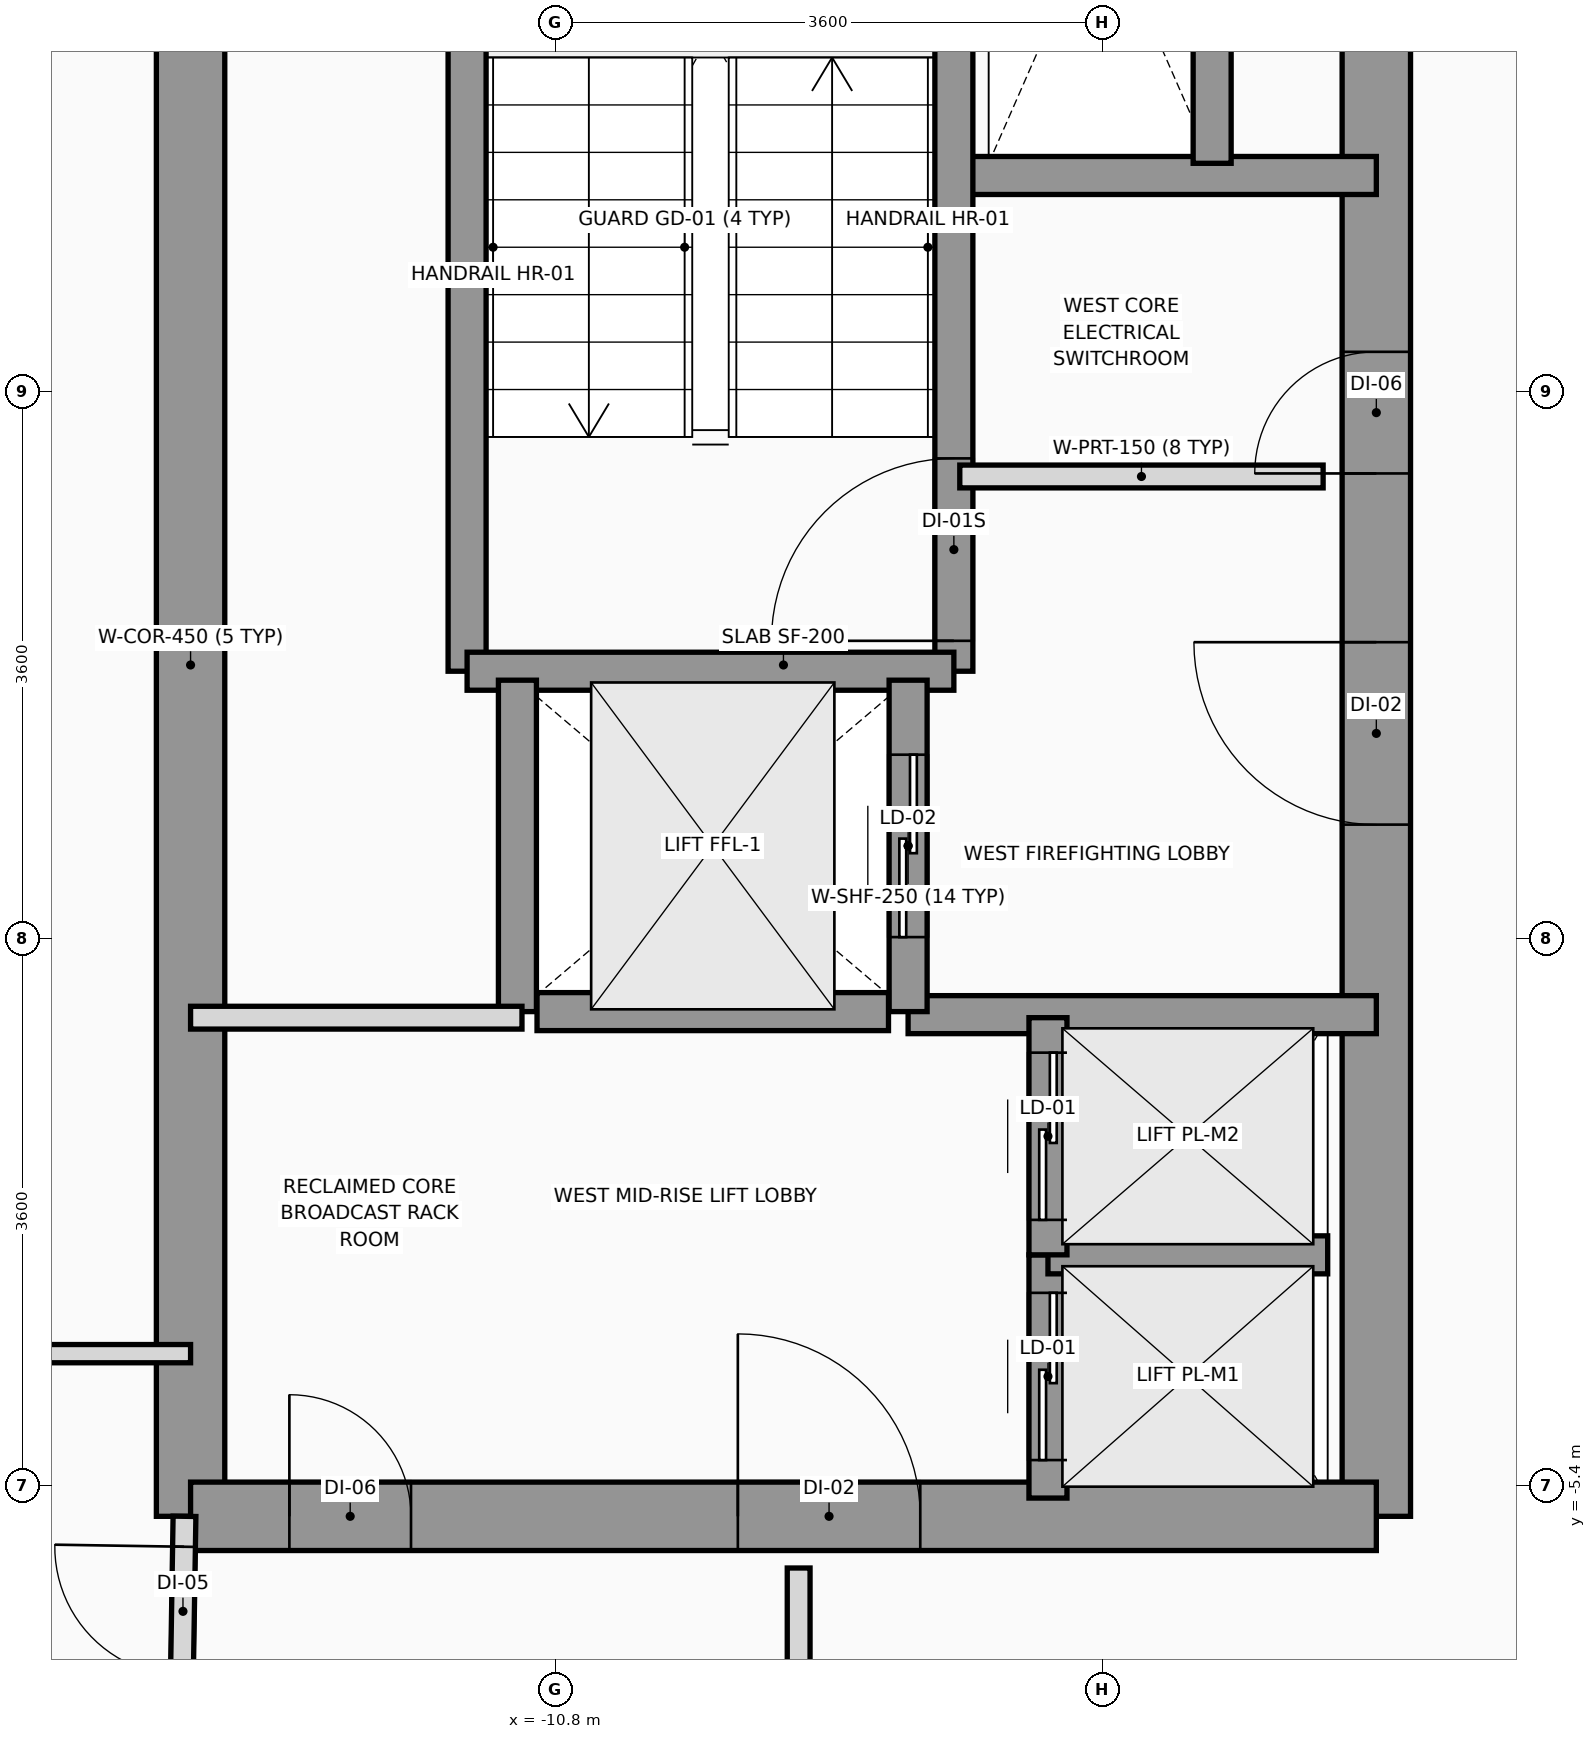
"""IFC4 building model, lengths in metres.
Left out: names, types, materials, properties, quantities, classifications, styles, units other than length and angle.
Written with IfcOpenShell. Run it as: python <this file> out.ifc"""

import sys

from ifc_helpers import new_model, si_unit, direction, frame, frame_2d, origin, place, context, subcontext, project, spatial, rectangle, extrude, source, transform, mapped, element, fill, save


model = new_model("IFC4")
c1 = context("Model", 3, precision=1e-05, world=origin(), true_north=direction((0.0, 1.0)))
c2 = subcontext(c1, "Body", "Model", "MODEL_VIEW")
j1 = project(units=[si_unit("LENGTHUNIT", "METRE"), si_unit("PLANEANGLEUNIT", "RADIAN")], contexts=[c1])
p1 = place(None, origin())
s1 = spatial("IfcSite", under=j1, at=p1, CompositionType="ELEMENT")
p2 = place(p1, origin())
s2 = spatial("IfcBuilding", under=s1, at=p2, CompositionType="ELEMENT")
p3 = place(p2, frame((0.0, 0.0, 100.6)))
s3 = spatial("IfcBuildingStorey", under=s2, at=p3, CompositionType="ELEMENT", Elevation=100.6)
p4 = place(p3, frame((-13.2, -5.6, 0.0), z_axis=(0.0, 0.0, 1.0), x_axis=(0.0, 1.0, 0.0)))
e1 = element("IfcWall", 1, at=p4, inside=s3, PredefinedType="SHEAR", context=c2, shape_type="SweptSolid", body=[
    extrude(rectangle(XDim=11.2, YDim=0.45, at=frame_2d((5.6, 0.0))), origin(), (0.0, 0.0, 1.0), 3.2),
])
p5 = place(p3, frame((-5.4, -5.6, 0.0), z_axis=(0.0, 0.0, 1.0), x_axis=(0.0, 1.0, 0.0)))
e2 = element("IfcWall", 2, at=p5, inside=s3, PredefinedType="SHEAR", context=c2, shape_type="SweptSolid", body=[
    extrude(rectangle(XDim=12.5, YDim=0.45, at=frame_2d((6.25, 0.0))), origin(), (0.0, 0.0, 1.0), 3.2),
])
p6 = place(p5, frame((4.55, 0.0, 0.0)))
e3 = element("IfcOpeningElement", 3, at=p6, cuts=e2, PredefinedType="OPENING", context=c2, shape_type="SweptSolid", body=[
    extrude(rectangle(XDim=1.2, YDim=2.2, at=frame_2d((0.6, 1.1))), frame((0.0, 0.235, 0.0), z_axis=(0.0, -1.0, 0.0), x_axis=(1.0, 0.0, 0.0)), (0.0, 0.0, 1.0), 0.47),
])
p7 = place(p5, frame((6.86, 0.0, 0.0)))
e4 = element("IfcOpeningElement", 4, at=p7, cuts=e2, PredefinedType="OPENING", context=c2, shape_type="SweptSolid", body=[
    extrude(rectangle(XDim=0.8, YDim=2.1, at=frame_2d((0.4, 1.05))), frame((0.0, 0.235, 0.0), z_axis=(0.0, -1.0, 0.0), x_axis=(1.0, 0.0, 0.0)), (0.0, 0.0, 1.0), 0.47),
])
p8 = place(p3, frame((-13.2, -5.6, 0.0), z_axis=(0.0, 0.0, 1.0), x_axis=(1.0, 0.0, 0.0)))
e5 = element("IfcWall", 5, at=p8, inside=s3, PredefinedType="SHEAR", context=c2, shape_type="SweptSolid", body=[
    extrude(rectangle(XDim=7.8, YDim=0.45, at=frame_2d((3.9, 0.0))), origin(), (0.0, 0.0, 1.0), 3.2),
])
p9 = place(p8, frame((3.6, 0.0, 0.0)))
e6 = element("IfcOpeningElement", 6, at=p9, cuts=e5, PredefinedType="OPENING", context=c2, shape_type="SweptSolid", body=[
    extrude(rectangle(XDim=1.2, YDim=2.2, at=frame_2d((0.6, 1.1))), frame((0.0, 0.235, 0.0), z_axis=(0.0, -1.0, 0.0), x_axis=(1.0, 0.0, 0.0)), (0.0, 0.0, 1.0), 0.47),
])
p10 = place(p8, frame((0.65, 0.0, 0.0)))
e7 = element("IfcOpeningElement", 7, at=p10, cuts=e5, PredefinedType="OPENING", context=c2, shape_type="SweptSolid", body=[
    extrude(rectangle(XDim=0.8, YDim=2.1, at=frame_2d((0.4, 1.05))), frame((0.0, 0.235, 0.0), z_axis=(0.0, -1.0, 0.0), x_axis=(1.0, 0.0, 0.0)), (0.0, 0.0, 1.0), 0.47),
])
p11 = place(p3, frame((-8.18, 3.22, 0.0), z_axis=(0.0, 0.0, 1.0), x_axis=(1.0, 0.0, 0.0)))
e8 = element("IfcWall", 8, at=p11, inside=s3, PredefinedType="SOLIDWALL", context=c2, shape_type="SweptSolid", body=[
    extrude(rectangle(XDim=2.78, YDim=0.25, at=frame_2d((1.39, 0.0))), origin(), (0.0, 0.0, 1.0), 3.2),
])
p12 = place(p3, frame((-8.48, -2.3, 0.0), z_axis=(0.0, 0.0, 1.0), x_axis=(1.0, 0.0, 0.0)))
e9 = element("IfcWall", 9, at=p12, inside=s3, PredefinedType="SOLIDWALL", context=c2, shape_type="SweptSolid", body=[
    extrude(rectangle(XDim=3.08, YDim=0.25, at=frame_2d((1.54, 0.0))), origin(), (0.0, 0.0, 1.0), 3.2),
])
p13 = place(p3, frame((-8.179, -0.041, 0.0), z_axis=(0.0, 0.0, 1.0), x_axis=(0.0, 1.0, 0.0)))
e10 = element("IfcWall", 10, at=p13, inside=s3, PredefinedType="SOLIDWALL", context=c2, shape_type="SweptSolid", body=[
    extrude(rectangle(XDim=6.941, YDim=0.25, at=frame_2d((3.47, 0.0))), origin(), (0.0, 0.0, 1.0), 3.2),
])
p14 = place(p13, frame((0.2, 0.0, 0.0)))
e11 = element("IfcOpeningElement", 11, at=p14, cuts=e10, PredefinedType="OPENING", context=c2, shape_type="SweptSolid", body=[
    extrude(rectangle(XDim=1.2, YDim=2.2, at=frame_2d((0.6, 1.1))), frame((0.0, 0.135, 0.0), z_axis=(0.0, -1.0, 0.0), x_axis=(1.0, 0.0, 0.0)), (0.0, 0.0, 1.0), 0.27),
])
p15 = place(p3, frame((-11.381, -0.041, 0.0), z_axis=(0.0, 0.0, 1.0), x_axis=(0.0, 1.0, 0.0)))
e12 = element("IfcWall", 12, at=p15, inside=s3, PredefinedType="SOLIDWALL", context=c2, shape_type="SweptSolid", body=[
    extrude(rectangle(XDim=6.941, YDim=0.25, at=frame_2d((3.47, 0.0))), origin(), (0.0, 0.0, 1.0), 3.2),
])
p16 = place(p3, frame((-11.381, -0.041, 0.0), z_axis=(0.0, 0.0, 1.0), x_axis=(1.0, 0.0, 0.0)))
e13 = element("IfcWall", 13, at=p16, inside=s3, PredefinedType="SOLIDWALL", context=c2, shape_type="SweptSolid", body=[
    extrude(rectangle(XDim=3.202, YDim=0.25, at=frame_2d((1.601, 0.0))), origin(), (0.0, 0.0, 1.0), 3.2),
])
p17 = place(p3, frame((-11.05, -2.28, 0.0), z_axis=(0.0, 0.0, 1.0), x_axis=(0.0, 1.0, 0.0)))
e14 = element("IfcWall", 14, at=p17, inside=s3, PredefinedType="SOLIDWALL", context=c2, shape_type="SweptSolid", body=[
    extrude(rectangle(XDim=2.18, YDim=0.25, at=frame_2d((1.09, 0.0))), origin(), (0.0, 0.0, 1.0), 3.2),
])
p18 = place(p3, frame((-8.48, -2.28, 0.0), z_axis=(0.0, 0.0, 1.0), x_axis=(0.0, 1.0, 0.0)))
e15 = element("IfcWall", 15, at=p18, inside=s3, PredefinedType="SOLIDWALL", context=c2, shape_type="SweptSolid", body=[
    extrude(rectangle(XDim=2.18, YDim=0.25, at=frame_2d((1.09, 0.0))), origin(), (0.0, 0.0, 1.0), 3.2),
])
p19 = place(p18, frame((0.49, 0.0, 0.0)))
e16 = element("IfcOpeningElement", 16, at=p19, cuts=e15, PredefinedType="OPENING", context=c2, shape_type="SweptSolid", body=[
    extrude(rectangle(XDim=1.2, YDim=2.2, at=frame_2d((0.6, 1.1))), frame((0.0, 0.135, 0.0), z_axis=(0.0, -1.0, 0.0), x_axis=(1.0, 0.0, 0.0)), (0.0, 0.0, 1.0), 0.27),
])
p20 = place(p3, frame((-10.921, -2.28, 0.0), z_axis=(0.0, 0.0, 1.0), x_axis=(1.0, 0.0, 0.0)))
e17 = element("IfcWall", 17, at=p20, inside=s3, PredefinedType="SOLIDWALL", context=c2, shape_type="SweptSolid", body=[
    extrude(rectangle(XDim=2.312, YDim=0.25, at=frame_2d((1.156, 0.0))), origin(), (0.0, 0.0, 1.0), 3.2),
])
p21 = place(p3, frame((-7.56, -5.48, 0.0), z_axis=(0.0, 0.0, 1.0), x_axis=(0.0, 1.0, 0.0)))
e18 = element("IfcWall", 18, at=p21, inside=s3, PredefinedType="SOLIDWALL", context=c2, shape_type="SweptSolid", body=[
    extrude(rectangle(XDim=1.6, YDim=0.25, at=frame_2d((0.8, 0.0))), origin(), (0.0, 0.0, 1.0), 3.2),
])
p22 = place(p21, frame((0.25, 0.0, 0.0)))
e19 = element("IfcOpeningElement", 19, at=p22, cuts=e18, PredefinedType="OPENING", context=c2, shape_type="SweptSolid", body=[
    extrude(rectangle(XDim=1.1, YDim=2.2, at=frame_2d((0.55, 1.1))), frame((0.0, 0.135, 0.0), z_axis=(0.0, -1.0, 0.0), x_axis=(1.0, 0.0, 0.0)), (0.0, 0.0, 1.0), 0.27),
])
p23 = place(p3, frame((-7.56, -3.88, 0.0), z_axis=(0.0, 0.0, 1.0), x_axis=(1.0, 0.0, 0.0)))
e20 = element("IfcWall", 20, at=p23, inside=s3, PredefinedType="SOLIDWALL", context=c2, shape_type="SweptSolid", body=[
    extrude(rectangle(XDim=1.84, YDim=0.25, at=frame_2d((0.92, 0.0))), origin(), (0.0, 0.0, 1.0), 3.2),
])
p24 = place(p3, frame((-7.56, -3.88, 0.0), z_axis=(0.0, 0.0, 1.0), x_axis=(0.0, 1.0, 0.0)))
e21 = element("IfcWall", 21, at=p24, inside=s3, PredefinedType="SOLIDWALL", context=c2, shape_type="SweptSolid", body=[
    extrude(rectangle(XDim=1.56, YDim=0.25, at=frame_2d((0.78, 0.0))), origin(), (0.0, 0.0, 1.0), 3.2),
])
p25 = place(p24, frame((0.23, 0.0, 0.0)))
e22 = element("IfcOpeningElement", 22, at=p25, cuts=e21, PredefinedType="OPENING", context=c2, shape_type="SweptSolid", body=[
    extrude(rectangle(XDim=1.1, YDim=2.2, at=frame_2d((0.55, 1.1))), frame((0.0, 0.135, 0.0), z_axis=(0.0, -1.0, 0.0), x_axis=(1.0, 0.0, 0.0)), (0.0, 0.0, 1.0), 0.27),
])
p26 = place(p3, frame((-6.48, 3.3, 0.0), z_axis=(0.0, 0.0, 1.0), x_axis=(0.0, 1.0, 0.0)))
e23 = element("IfcWall", 23, at=p26, inside=s3, PredefinedType="SOLIDWALL", context=c2, shape_type="SweptSolid", body=[
    extrude(rectangle(XDim=1.68, YDim=0.25, at=frame_2d((0.84, 0.0))), origin(), (0.0, 0.0, 1.0), 3.2),
])
p27 = place(p3, frame((-8.14, 1.24, 0.0), z_axis=(0.0, 0.0, 1.0), x_axis=(1.0, 0.0, 0.0)))
e24 = element("IfcWall", 24, at=p27, inside=s3, PredefinedType="PARTITIONING", context=c2, shape_type="SweptSolid", body=[
    extrude(rectangle(XDim=2.39, YDim=0.15, at=frame_2d((1.195, 0.0))), origin(), (0.0, 0.0, 1.0), 2.3),
])
p28 = place(p3, frame((-13.2, -2.32, 0.0), z_axis=(0.0, 0.0, 1.0), x_axis=(1.0, 0.0, 0.0)))
e25 = element("IfcWall", 25, at=p28, inside=s3, PredefinedType="PARTITIONING", context=c2, shape_type="SweptSolid", body=[
    extrude(rectangle(XDim=2.18, YDim=0.15, at=frame_2d((1.09, 0.0))), origin(), (0.0, 0.0, 1.0), 3.2),
])
p29 = place(p3, frame((-9.2, -15.68, 0.0), z_axis=(0.0, 0.0, 1.0), x_axis=(0.0, 1.0, 0.0)))
e26 = element("IfcWall", 26, at=p29, inside=s3, PredefinedType="PARTITIONING", context=c2, shape_type="SweptSolid", body=[
    extrude(rectangle(XDim=9.74, YDim=0.15, at=frame_2d((4.87, 0.0))), origin(), (0.0, 0.0, 1.0), 2.7),
])
p30 = place(p3, frame((-13.26, -6.85, 0.0), z_axis=(0.0, 0.0, 1.0), x_axis=(0.016013571389, 0.999871774545, 0.0)))
e27 = element("IfcWall", 27, at=p30, inside=s3, PredefinedType="PARTITIONING", context=c2, shape_type="SweptSolid", body=[
    extrude(rectangle(XDim=1.25, YDim=0.15, at=frame_2d((0.625, 0.0))), origin(), (0.0, 0.0, 1.0), 3.2),
])
p31 = place(p30, frame((0.2, 0.0, 0.0)))
e28 = element("IfcOpeningElement", 28, at=p31, cuts=e27, PredefinedType="OPENING", context=c2, shape_type="SweptSolid", body=[
    extrude(rectangle(XDim=0.85, YDim=2.1, at=frame_2d((0.425, 1.05))), frame((0.0, 0.085, 0.0), z_axis=(0.0, -1.0, 0.0), x_axis=(1.0, 0.0, 0.0)), (0.0, 0.0, 1.0), 0.17),
])
p32 = place(p3, frame((-23.3, -4.53, 0.0), z_axis=(0.0, 0.0, 1.0), x_axis=(1.0, 0.0, 0.0)))
e29 = element("IfcWall", 29, at=p32, inside=s3, PredefinedType="PARTITIONING", context=c2, shape_type="SweptSolid", body=[
    extrude(rectangle(XDim=10.1, YDim=0.12, at=frame_2d((5.05, 0.0))), origin(), (0.0, 0.0, 1.0), 2.75),
])
p33 = place(p32, frame((2.1, 0.0, 0.0)))
e30 = element("IfcOpeningElement", 30, at=p33, cuts=e29, PredefinedType="OPENING", context=c2, shape_type="SweptSolid", body=[
    extrude(rectangle(XDim=0.95, YDim=2.15, at=frame_2d((0.475, 1.075))), frame((0.0, 0.07, 0.0), z_axis=(0.0, -1.0, 0.0), x_axis=(1.0, 0.0, 0.0)), (0.0, 0.0, 1.0), 0.14),
])
m1 = source(origin(), c2, "Body", "SweptSolid", [
    extrude(rectangle(XDim=1.2, YDim=2.2, at=frame_2d((0.6, 1.1))), frame((0.0, 0.025, 0.0), z_axis=(0.0, -1.0, 0.0), x_axis=(1.0, 0.0, 0.0)), (0.0, 0.0, 1.0), 0.05),
])
p34 = place(p14, origin())
e31 = element("IfcDoor", 31, at=p34, inside=s3, OperationType="SINGLE_SWING_LEFT", PredefinedType="DOOR", context=c2, shape_type="MappedRepresentation", body=[
    mapped(m1, transform((0.0, 0.0, 0.0), x_axis=(1.0, 0.0, 0.0), y_axis=(0.0, 1.0, 0.0), z_axis=(0.0, 0.0, 1.0), scale=1.0)),
])
fill(e11, e31)
p35 = place(p6, origin())
e32 = element("IfcDoor", 32, at=p35, inside=s3, OperationType="SINGLE_SWING_RIGHT", PredefinedType="DOOR", context=c2, shape_type="MappedRepresentation", body=[
    mapped(m1, transform((0.0, 0.0, 0.0), x_axis=(1.0, 0.0, 0.0), y_axis=(0.0, 1.0, 0.0), z_axis=(0.0, 0.0, 1.0), scale=1.0)),
])
fill(e3, e32)
p36 = place(p9, origin())
e33 = element("IfcDoor", 33, at=p36, inside=s3, OperationType="SINGLE_SWING_LEFT", PredefinedType="DOOR", context=c2, shape_type="MappedRepresentation", body=[
    mapped(m1, transform((0.0, 0.0, 0.0), x_axis=(1.0, 0.0, 0.0), y_axis=(0.0, 1.0, 0.0), z_axis=(0.0, 0.0, 1.0), scale=1.0)),
])
fill(e6, e33)
m2 = source(origin(), c2, "Body", "SweptSolid", [
    extrude(rectangle(XDim=0.8, YDim=2.1, at=frame_2d((0.4, 1.05))), frame((0.0, 0.025, 0.0), z_axis=(0.0, -1.0, 0.0), x_axis=(1.0, 0.0, 0.0)), (0.0, 0.0, 1.0), 0.05),
])
p37 = place(p7, origin())
e34 = element("IfcDoor", 34, at=p37, inside=s3, OperationType="SINGLE_SWING_LEFT", PredefinedType="DOOR", context=c2, shape_type="MappedRepresentation", body=[
    mapped(m2, transform((0.0, 0.0, 0.0), x_axis=(1.0, 0.0, 0.0), y_axis=(0.0, 1.0, 0.0), z_axis=(0.0, 0.0, 1.0), scale=1.0)),
])
fill(e4, e34)
p38 = place(p10, origin())
e35 = element("IfcDoor", 35, at=p38, inside=s3, OperationType="SINGLE_SWING_LEFT", PredefinedType="DOOR", context=c2, shape_type="MappedRepresentation", body=[
    mapped(m2, transform((0.0, 0.0, 0.0), x_axis=(1.0, 0.0, 0.0), y_axis=(0.0, 1.0, 0.0), z_axis=(0.0, 0.0, 1.0), scale=1.0)),
])
fill(e7, e35)
p39 = place(p19, origin())
e36 = element("IfcDoor", 36, at=p39, inside=s3, OperationType="SLIDING_TO_RIGHT", PredefinedType="DOOR", context=c2, shape_type="MappedRepresentation", body=[
    mapped(m1, transform((0.0, 0.0, 0.0), x_axis=(1.0, 0.0, 0.0), y_axis=(0.0, 1.0, 0.0), z_axis=(0.0, 0.0, 1.0), scale=1.0)),
])
fill(e16, e36)
m3 = source(origin(), c2, "Body", "SweptSolid", [
    extrude(rectangle(XDim=1.1, YDim=2.2, at=frame_2d((0.55, 1.1))), frame((0.0, 0.025, 0.0), z_axis=(0.0, -1.0, 0.0), x_axis=(1.0, 0.0, 0.0)), (0.0, 0.0, 1.0), 0.05),
])
p40 = place(p22, origin())
e37 = element("IfcDoor", 37, at=p40, inside=s3, OperationType="SLIDING_TO_LEFT", PredefinedType="DOOR", context=c2, shape_type="MappedRepresentation", body=[
    mapped(m3, transform((0.0, 0.0, 0.0), x_axis=(1.0, 0.0, 0.0), y_axis=(0.0, 1.0, 0.0), z_axis=(0.0, 0.0, 1.0), scale=1.0)),
])
fill(e19, e37)
p41 = place(p25, origin())
e38 = element("IfcDoor", 38, at=p41, inside=s3, OperationType="SLIDING_TO_LEFT", PredefinedType="DOOR", context=c2, shape_type="MappedRepresentation", body=[
    mapped(m3, transform((0.0, 0.0, 0.0), x_axis=(1.0, 0.0, 0.0), y_axis=(0.0, 1.0, 0.0), z_axis=(0.0, 0.0, 1.0), scale=1.0)),
])
fill(e22, e38)
m4 = source(origin(), c2, "Body", "SweptSolid", [
    extrude(rectangle(XDim=0.85, YDim=2.1, at=frame_2d((0.425, 1.05))), frame((0.0, 0.025, 0.0), z_axis=(0.0, -1.0, 0.0), x_axis=(1.0, 0.0, 0.0)), (0.0, 0.0, 1.0), 0.05),
])
p42 = place(p31, origin())
e39 = element("IfcDoor", 39, at=p42, inside=s3, OperationType="SINGLE_SWING_RIGHT", PredefinedType="DOOR", context=c2, shape_type="MappedRepresentation", body=[
    mapped(m4, transform((0.0, 0.0, 0.0), x_axis=(1.0, 0.0, 0.0), y_axis=(0.0, 1.0, 0.0), z_axis=(0.0, 0.0, 1.0), scale=1.0)),
])
fill(e28, e39)
save(model, sys.argv[1])
